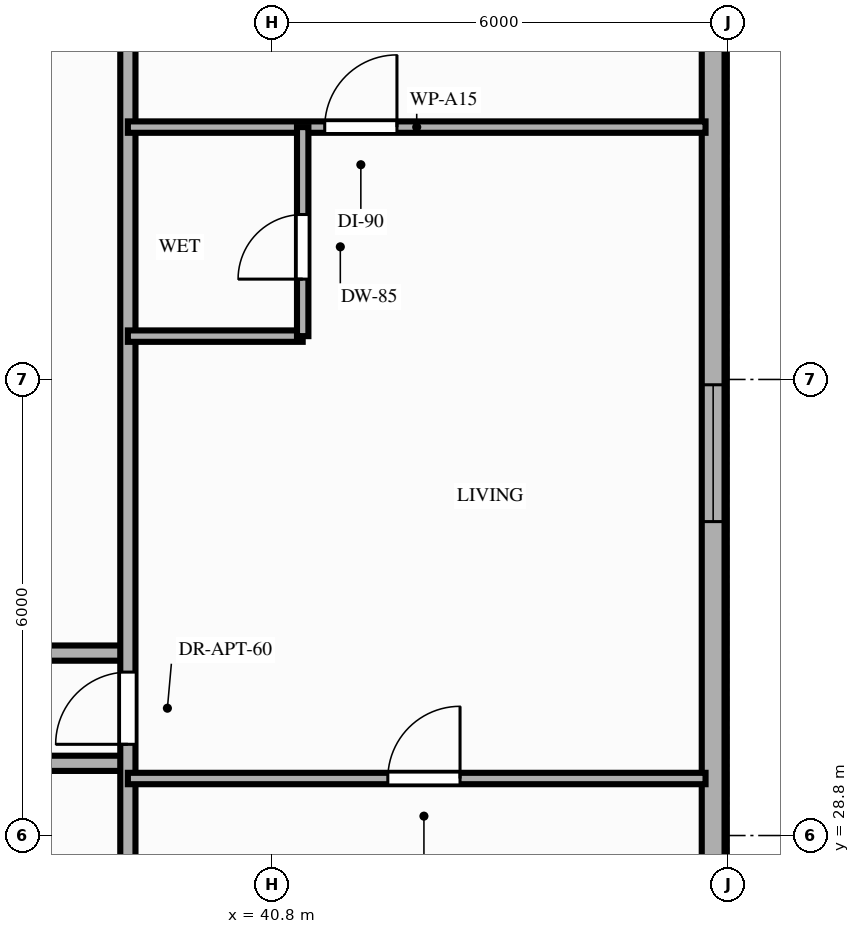
"""IFC4 building model, lengths in metres.
Left out: names, types, materials, properties, quantities, classifications, styles, units other than length and angle.
Written with IfcOpenShell. Run it as: python <this file> out.ifc"""

import sys

from ifc_helpers import new_model, si_unit, direction, frame, frame_2d, origin, place, context, subcontext, project, spatial, rectangle, extrude, element, fill, save


model = new_model("IFC4")
c1 = context("Model", 3, precision=1e-05, world=origin(), true_north=direction((0.0, 1.0)))
c2 = subcontext(c1, "Body", "Model", "MODEL_VIEW")
j1 = project(units=[si_unit("LENGTHUNIT", "METRE"), si_unit("PLANEANGLEUNIT", "RADIAN")], contexts=[c1])
p1 = place(None, origin())
s1 = spatial("IfcSite", under=j1, at=p1, CompositionType="ELEMENT")
p2 = place(p1, origin())
s2 = spatial("IfcBuilding", under=s1, at=p2, CompositionType="ELEMENT")
p3 = place(p2, frame((0.0, 0.0, 107.4)))
s3 = spatial("IfcBuildingStorey", under=s2, at=p3, CompositionType="ELEMENT", Elevation=107.4)
p4 = place(p3, frame((46.6, 26.8, 0.0), z_axis=(0.0, 0.0, 1.0), x_axis=(0.0, 1.0, 0.0)))
e1 = element("IfcWall", 1, at=p4, inside=s3, PredefinedType="STANDARD", context=c2, shape_type="SweptSolid", body=[
    extrude(rectangle(XDim=15.35, YDim=0.3, at=frame_2d((7.675, 0.0))), origin(), (0.0, 0.0, 1.0), 3.02),
])
p5 = place(p4, frame((6.13, 0.0, 0.85)))
e2 = element("IfcOpeningElement", 2, at=p5, cuts=e1, PredefinedType="OPENING", context=c2, shape_type="SweptSolid", body=[
    extrude(rectangle(XDim=1.8, YDim=1.75, at=frame_2d((0.9, 0.875))), frame((0.0, 0.16, 0.0), z_axis=(0.0, -1.0, 0.0), x_axis=(1.0, 0.0, 0.0)), (0.0, 0.0, 1.0), 0.32),
])
p6 = place(p3, frame((27.15, 29.75, 0.0), z_axis=(0.0, 0.0, 1.0), x_axis=(1.0, 0.0, 0.0)))
e3 = element("IfcWall", 3, at=p6, inside=s3, PredefinedType="PARTITIONING", context=c2, shape_type="SweptSolid", body=[
    extrude(rectangle(XDim=11.75, YDim=0.2, at=frame_2d((5.875, 0.0))), origin(), (0.0, 0.0, 1.0), 2.41),
])
p7 = place(p6, frame((1.7, 0.0, 0.0)))
e4 = element("IfcOpeningElement", 4, at=p7, cuts=e3, PredefinedType="OPENING", context=c2, shape_type="SweptSolid", body=[
    extrude(rectangle(XDim=0.95, YDim=2.15, at=frame_2d((0.475, 1.075))), frame((0.0, 0.11, 0.0), z_axis=(0.0, -1.0, 0.0), x_axis=(1.0, 0.0, 0.0)), (0.0, 0.0, 1.0), 0.22),
])
p8 = place(p6, frame((7.57, 0.0, 0.0)))
e5 = element("IfcOpeningElement", 5, at=p8, cuts=e3, PredefinedType="OPENING", context=c2, shape_type="SweptSolid", body=[
    extrude(rectangle(XDim=0.95, YDim=2.15, at=frame_2d((0.475, 1.075))), frame((0.0, 0.11, 0.0), z_axis=(0.0, -1.0, 0.0), x_axis=(1.0, 0.0, 0.0)), (0.0, 0.0, 1.0), 0.22),
])
p9 = place(p3, frame((27.15, 31.2, 0.0), z_axis=(0.0, 0.0, 1.0), x_axis=(1.0, 0.0, 0.0)))
e6 = element("IfcWall", 6, at=p9, inside=s3, PredefinedType="PARTITIONING", context=c2, shape_type="SweptSolid", body=[
    extrude(rectangle(XDim=11.75, YDim=0.2, at=frame_2d((5.875, 0.0))), origin(), (0.0, 0.0, 1.0), 2.41),
])
p10 = place(p9, frame((1.81, 0.0, 0.0)))
e7 = element("IfcOpeningElement", 7, at=p10, cuts=e6, PredefinedType="OPENING", context=c2, shape_type="SweptSolid", body=[
    extrude(rectangle(XDim=0.95, YDim=2.15, at=frame_2d((0.475, 1.075))), frame((0.0, 0.11, 0.0), z_axis=(0.0, -1.0, 0.0), x_axis=(1.0, 0.0, 0.0)), (0.0, 0.0, 1.0), 0.22),
])
p11 = place(p9, frame((5.75, 0.0, 0.0)))
e8 = element("IfcOpeningElement", 8, at=p11, cuts=e6, PredefinedType="OPENING", context=c2, shape_type="SweptSolid", body=[
    extrude(rectangle(XDim=0.95, YDim=2.15, at=frame_2d((0.475, 1.075))), frame((0.0, 0.11, 0.0), z_axis=(0.0, -1.0, 0.0), x_axis=(1.0, 0.0, 0.0)), (0.0, 0.0, 1.0), 0.22),
])
p12 = place(p9, frame((9.33, 0.0, 0.0)))
e9 = element("IfcOpeningElement", 9, at=p12, cuts=e6, PredefinedType="OPENING", context=c2, shape_type="SweptSolid", body=[
    extrude(rectangle(XDim=0.95, YDim=2.15, at=frame_2d((0.475, 1.075))), frame((0.0, 0.11, 0.0), z_axis=(0.0, -1.0, 0.0), x_axis=(1.0, 0.0, 0.0)), (0.0, 0.0, 1.0), 0.22),
])
p13 = place(p3, frame((38.9, 26.75, 0.0), z_axis=(0.0, 0.0, 1.0), x_axis=(0.0, 1.0, 0.0)))
e10 = element("IfcWall", 10, at=p13, inside=s3, PredefinedType="PARTITIONING", context=c2, shape_type="SweptSolid", body=[
    extrude(rectangle(XDim=15.45, YDim=0.2, at=frame_2d((7.725, 0.0))), origin(), (0.0, 0.0, 1.0), 2.41),
])
p14 = place(p13, frame((3.25, 0.0, 0.0)))
e11 = element("IfcOpeningElement", 11, at=p14, cuts=e10, PredefinedType="OPENING", context=c2, shape_type="SweptSolid", body=[
    extrude(rectangle(XDim=0.95, YDim=2.15, at=frame_2d((0.475, 1.075))), frame((0.0, 0.11, 0.0), z_axis=(0.0, -1.0, 0.0), x_axis=(1.0, 0.0, 0.0)), (0.0, 0.0, 1.0), 0.22),
])
p15 = place(p3, frame((38.9, 29.55, 0.0), z_axis=(0.0, 0.0, 1.0), x_axis=(1.0, 0.0, 0.0)))
e12 = element("IfcWall", 12, at=p15, inside=s3, PredefinedType="PARTITIONING", context=c2, shape_type="SweptSolid", body=[
    extrude(rectangle(XDim=7.6, YDim=0.15, at=frame_2d((3.8, 0.0))), origin(), (0.0, 0.0, 1.0), 2.41),
])
p16 = place(p15, frame((3.42, 0.0, 0.0)))
e13 = element("IfcOpeningElement", 13, at=p16, cuts=e12, PredefinedType="OPENING", context=c2, shape_type="SweptSolid", body=[
    extrude(rectangle(XDim=0.95, YDim=2.15, at=frame_2d((0.475, 1.075))), frame((0.0, 0.085, 0.0), z_axis=(0.0, -1.0, 0.0), x_axis=(1.0, 0.0, 0.0)), (0.0, 0.0, 1.0), 0.17),
])
p17 = place(p3, frame((38.9, 38.12, 0.0), z_axis=(0.0, 0.0, 1.0), x_axis=(1.0, 0.0, 0.0)))
e14 = element("IfcWall", 14, at=p17, inside=s3, PredefinedType="PARTITIONING", context=c2, shape_type="SweptSolid", body=[
    extrude(rectangle(XDim=7.6, YDim=0.15, at=frame_2d((3.8, 0.0))), origin(), (0.0, 0.0, 1.0), 2.41),
])
p18 = place(p17, frame((2.59, 0.0, 0.0)))
e15 = element("IfcOpeningElement", 15, at=p18, cuts=e14, PredefinedType="OPENING", context=c2, shape_type="SweptSolid", body=[
    extrude(rectangle(XDim=0.95, YDim=2.15, at=frame_2d((0.475, 1.075))), frame((0.0, 0.085, 0.0), z_axis=(0.0, -1.0, 0.0), x_axis=(1.0, 0.0, 0.0)), (0.0, 0.0, 1.0), 0.17),
])
p19 = place(p3, frame((38.9, 35.37, 0.0), z_axis=(0.0, 0.0, 1.0), x_axis=(1.0, 0.0, 0.0)))
e16 = element("IfcWall", 16, at=p19, inside=s3, PredefinedType="PARTITIONING", context=c2, shape_type="SweptSolid", body=[
    extrude(rectangle(XDim=2.3, YDim=0.15, at=frame_2d((1.15, 0.0))), origin(), (0.0, 0.0, 1.0), 2.41),
])
p20 = place(p3, frame((41.2, 35.37, 0.0), z_axis=(0.0, 0.0, 1.0), x_axis=(0.0, 1.0, 0.0)))
e17 = element("IfcWall", 17, at=p20, inside=s3, PredefinedType="PARTITIONING", context=c2, shape_type="SweptSolid", body=[
    extrude(rectangle(XDim=2.75, YDim=0.15, at=frame_2d((1.375, 0.0))), origin(), (0.0, 0.0, 1.0), 2.41),
])
p21 = place(p20, frame((0.75, 0.0, 0.0)))
e18 = element("IfcOpeningElement", 18, at=p21, cuts=e17, PredefinedType="OPENING", context=c2, shape_type="SweptSolid", body=[
    extrude(rectangle(XDim=0.85, YDim=2.1, at=frame_2d((0.425, 1.05))), frame((0.0, 0.085, 0.0), z_axis=(0.0, -1.0, 0.0), x_axis=(1.0, 0.0, 0.0)), (0.0, 0.0, 1.0), 0.17),
])
p22 = place(p5, origin())
e19 = element("IfcWindow", 19, at=p22, inside=s3, PartitioningType="SINGLE_PANEL", PredefinedType="WINDOW", context=c2, shape_type="SweptSolid", body=[
    extrude(rectangle(XDim=1.8, YDim=1.75, at=frame_2d((0.9, 0.875))), frame((0.0, 0.03, 0.0), z_axis=(0.0, -1.0, 0.0), x_axis=(1.0, 0.0, 0.0)), (0.0, 0.0, 1.0), 0.06),
])
fill(e2, e19)
p23 = place(p14, origin())
e20 = element("IfcDoor", 20, at=p23, inside=s3, OperationType="SINGLE_SWING_LEFT", PredefinedType="DOOR", context=c2, shape_type="SweptSolid", body=[
    extrude(rectangle(XDim=0.95, YDim=2.15, at=frame_2d((0.475, 1.075))), frame((0.0, 0.025, 0.0), z_axis=(0.0, -1.0, 0.0), x_axis=(1.0, 0.0, 0.0)), (0.0, 0.0, 1.0), 0.05),
])
fill(e11, e20)
p24 = place(p18, origin())
e21 = element("IfcDoor", 21, at=p24, inside=s3, OperationType="SINGLE_SWING_RIGHT", PredefinedType="DOOR", context=c2, shape_type="SweptSolid", body=[
    extrude(rectangle(XDim=0.95, YDim=2.15, at=frame_2d((0.475, 1.075))), frame((0.0, 0.025, 0.0), z_axis=(0.0, -1.0, 0.0), x_axis=(1.0, 0.0, 0.0)), (0.0, 0.0, 1.0), 0.05),
])
fill(e15, e21)
p25 = place(p21, origin())
e22 = element("IfcDoor", 22, at=p25, inside=s3, OperationType="SINGLE_SWING_LEFT", PredefinedType="DOOR", context=c2, shape_type="SweptSolid", body=[
    extrude(rectangle(XDim=0.85, YDim=2.1, at=frame_2d((0.425, 1.05))), frame((0.0, 0.025, 0.0), z_axis=(0.0, -1.0, 0.0), x_axis=(1.0, 0.0, 0.0)), (0.0, 0.0, 1.0), 0.05),
])
fill(e18, e22)
p26 = place(p16, origin())
e23 = element("IfcDoor", 23, at=p26, inside=s3, OperationType="SINGLE_SWING_RIGHT", PredefinedType="DOOR", context=c2, shape_type="SweptSolid", body=[
    extrude(rectangle(XDim=0.95, YDim=2.15, at=frame_2d((0.475, 1.075))), frame((0.0, 0.025, 0.0), z_axis=(0.0, -1.0, 0.0), x_axis=(1.0, 0.0, 0.0)), (0.0, 0.0, 1.0), 0.05),
])
fill(e13, e23)
save(model, sys.argv[1])
